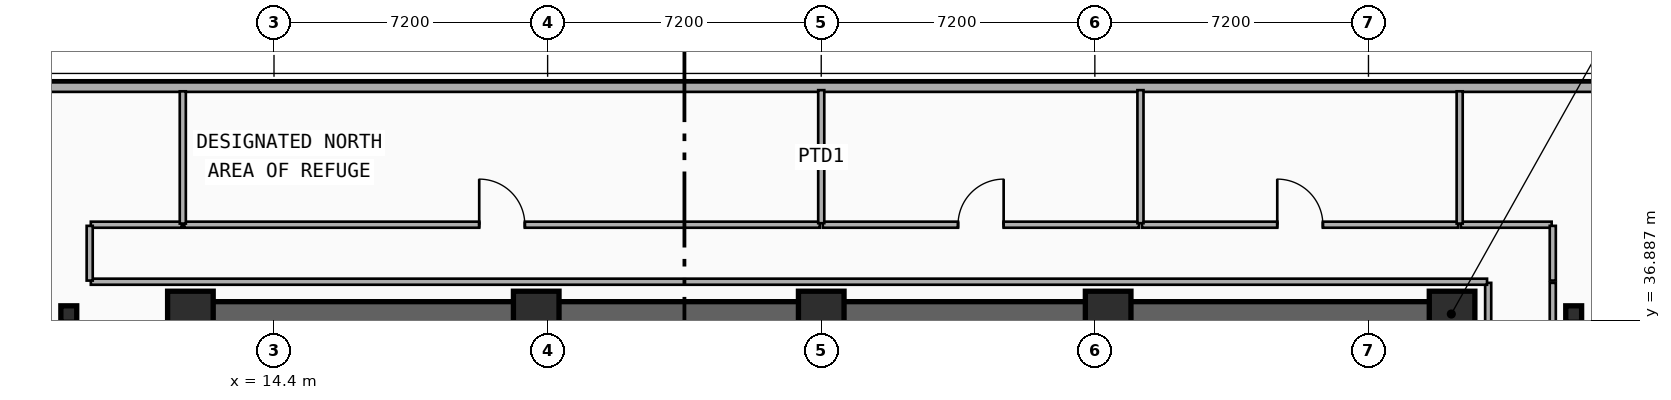
"""IFC4 building model, lengths in metres.
Left out: names, types, materials, properties, quantities, classifications, styles, units other than length and angle.
Written with IfcOpenShell. Run it as: python <this file> out.ifc"""

import sys

from ifc_helpers import new_model, si_unit, direction, frame, frame_2d, origin, origin_2d, place, context, subcontext, project, spatial, rectangle, i_section, extrude, element, fill, save


model = new_model("IFC4")
c1 = context("Model", 3, precision=1e-05, world=origin(), true_north=direction((0.0, 1.0)))
c2 = subcontext(c1, "Body", "Model", "MODEL_VIEW")
j1 = project(units=[si_unit("LENGTHUNIT", "METRE"), si_unit("PLANEANGLEUNIT", "RADIAN")], contexts=[c1])
p1 = place(None, origin())
s1 = spatial("IfcSite", under=j1, at=p1, CompositionType="ELEMENT")
p2 = place(p1, origin())
s2 = spatial("IfcBuilding", under=s1, at=p2, CompositionType="ELEMENT")
p3 = place(p2, frame((0.0, 0.0, 132.9)))
s3 = spatial("IfcBuildingStorey", under=s2, at=p3, CompositionType="ELEMENT", Elevation=132.9)
p4 = place(p3, frame((12.15, 37.05, 0.0), z_axis=(0.0, 0.0, 1.0), x_axis=(1.0, 0.0, 0.0)))
e1 = element("IfcWall", 1, at=p4, inside=s3, PredefinedType="SHEAR", context=c2, shape_type="SweptSolid", body=[
    extrude(rectangle(XDim=33.23, YDim=0.65, at=frame_2d((16.615, 0.0))), origin(), (0.0, 0.0, 1.0), 4.8),
])
for number, where, z_axis, x_axis in (
    (2, (12.2, 37.05, 0.0), (0.0, 0.0, 1.0), (1.0, 0.0, 0.0)),
    (3, (21.3, 37.05, 0.0), (0.0, 0.0, 1.0), (1.0, 0.0, 0.0)),
    (4, (28.8, 37.05, 0.0), (0.0, 0.0, 1.0), (1.0, 0.0, 0.0)),
    (5, (36.35, 37.05, 0.0), (0.0, 0.0, 1.0), (1.0, 0.0, 0.0)),
    (6, (45.4, 37.05, 0.0), (0.0, 0.0, 1.0), (1.0, 0.0, 0.0)),
):
    element("IfcColumn", number, at=place(p3, frame(where, z_axis=z_axis, x_axis=x_axis)), inside=s3, PredefinedType="COLUMN", context=c2, shape_type="SweptSolid", body=[
        extrude(rectangle(XDim=1.2, YDim=1.2, at=origin_2d()), origin(), (0.0, 0.0, 1.0), 4.8),
    ])
for number, where, z_axis, x_axis in (
    (7, (9.0, 37.05, 0.0), (0.0, 0.0, 1.0), (1.0, 0.0, 0.0)),
    (8, (48.6, 37.05, 0.0), (0.0, 0.0, 1.0), (1.0, 0.0, 0.0)),
):
    element("IfcColumn", number, at=place(p3, frame(where, z_axis=z_axis, x_axis=x_axis)), inside=s3, PredefinedType="COLUMN", context=c2, shape_type="SweptSolid", body=[
        extrude(i_section(OverallWidth=0.418, OverallDepth=0.432, WebThickness=0.035, FlangeThickness=0.056, FilletRadius=0.015, at=origin_2d()), origin(), (0.0, 0.0, 1.0), 4.8),
    ])
p5 = place(p3, frame((4.2, 43.02, 0.0), z_axis=(0.0, 0.0, 1.0), x_axis=(1.0, 0.0, 0.0)))
e9 = element("IfcWall", 9, at=p5, inside=s3, PredefinedType="SOLIDWALL", context=c2, shape_type="SweptSolid", body=[
    extrude(rectangle(XDim=49.2, YDim=0.25, at=frame_2d((24.6, 0.0))), origin(), (0.0, 0.0, 1.0), 4.48),
])
p6 = place(p3, frame((12.04, 39.4, 0.0), z_axis=(0.0, 0.0, 1.0), x_axis=(1.0, 0.0, 0.0)))
e10 = element("IfcWall", 10, at=p6, inside=s3, PredefinedType="PARTITIONING", context=c2, shape_type="SweptSolid", body=[
    extrude(rectangle(XDim=16.72, YDim=0.16, at=frame_2d((8.36, 0.0))), origin(), (0.0, 0.0, 1.0), 4.48),
])
p7 = place(p6, frame((7.76, 0.0, 0.0)))
e11 = element("IfcOpeningElement", 11, at=p7, cuts=e10, PredefinedType="OPENING", context=c2, shape_type="SweptSolid", body=[
    extrude(rectangle(XDim=1.2, YDim=2.15, at=frame_2d((0.6, 1.075))), frame((0.0, 0.09, 0.0), z_axis=(0.0, -1.0, 0.0), x_axis=(1.0, 0.0, 0.0)), (0.0, 0.0, 1.0), 0.18),
])
p8 = place(p3, frame((28.84, 39.4, 0.0), z_axis=(0.0, 0.0, 1.0), x_axis=(1.0, 0.0, 0.0)))
e12 = element("IfcWall", 12, at=p8, inside=s3, PredefinedType="PARTITIONING", context=c2, shape_type="SweptSolid", body=[
    extrude(rectangle(XDim=8.32, YDim=0.16, at=frame_2d((4.16, 0.0))), origin(), (0.0, 0.0, 1.0), 4.48),
])
p9 = place(p8, frame((3.56, 0.0, 0.0)))
e13 = element("IfcOpeningElement", 13, at=p9, cuts=e12, PredefinedType="OPENING", context=c2, shape_type="SweptSolid", body=[
    extrude(rectangle(XDim=1.2, YDim=2.15, at=frame_2d((0.6, 1.075))), frame((0.0, 0.09, 0.0), z_axis=(0.0, -1.0, 0.0), x_axis=(1.0, 0.0, 0.0)), (0.0, 0.0, 1.0), 0.18),
])
p10 = place(p3, frame((37.24, 39.4, 0.0), z_axis=(0.0, 0.0, 1.0), x_axis=(1.0, 0.0, 0.0)))
e14 = element("IfcWall", 14, at=p10, inside=s3, PredefinedType="PARTITIONING", context=c2, shape_type="SweptSolid", body=[
    extrude(rectangle(XDim=8.32, YDim=0.16, at=frame_2d((4.16, 0.0))), origin(), (0.0, 0.0, 1.0), 4.48),
])
p11 = place(p10, frame((3.56, 0.0, 0.0)))
e15 = element("IfcOpeningElement", 15, at=p11, cuts=e14, PredefinedType="OPENING", context=c2, shape_type="SweptSolid", body=[
    extrude(rectangle(XDim=1.2, YDim=2.15, at=frame_2d((0.6, 1.075))), frame((0.0, 0.09, 0.0), z_axis=(0.0, -1.0, 0.0), x_axis=(1.0, 0.0, 0.0)), (0.0, 0.0, 1.0), 0.18),
])
for number, where, z_axis, x_axis in (
    (16, (28.8, 39.44, 0.0), (0.0, 0.0, 1.0), (0.0, 1.0, 0.0)),
    (17, (37.2, 39.44, 0.0), (0.0, 0.0, 1.0), (0.0, 1.0, 0.0)),
):
    element("IfcWall", number, at=place(p3, frame(where, z_axis=z_axis, x_axis=x_axis)), inside=s3, PredefinedType="PARTITIONING", context=c2, shape_type="SweptSolid", body=[
        extrude(rectangle(XDim=3.5, YDim=0.16, at=frame_2d((1.75, 0.0))), origin(), (0.0, 0.0, 1.0), 4.48),
    ])
for number, where, z_axis, x_axis in (
    (18, (46.35, 27.63, 0.0), (0.0, 0.0, 1.0), (0.0, 1.0, 0.0)),
    (19, (48.05, 27.63, 0.0), (0.0, 0.0, 1.0), (0.0, 1.0, 0.0)),
):
    element("IfcWall", number, at=place(p3, frame(where, z_axis=z_axis, x_axis=x_axis)), inside=s3, PredefinedType="PARTITIONING", context=c2, shape_type="SweptSolid", body=[
        extrude(rectangle(XDim=10.24, YDim=0.16, at=frame_2d((5.12, 0.0))), origin(), (0.0, 0.0, 1.0), 3.96),
    ])
p12 = place(p3, frame((9.58, 37.9, 0.0), z_axis=(0.0, 0.0, 1.0), x_axis=(1.0, 0.0, 0.0)))
e20 = element("IfcWall", 20, at=p12, inside=s3, PredefinedType="PARTITIONING", context=c2, shape_type="SweptSolid", body=[
    extrude(rectangle(XDim=36.74, YDim=0.16, at=frame_2d((18.37, 0.0))), origin(), (0.0, 0.0, 1.0), 4.48),
])
p13 = place(p3, frame((9.58, 39.4, 0.0), z_axis=(0.0, 0.0, 1.0), x_axis=(1.0, 0.0, 0.0)))
e21 = element("IfcWall", 21, at=p13, inside=s3, PredefinedType="PARTITIONING", context=c2, shape_type="SweptSolid", body=[
    extrude(rectangle(XDim=2.39, YDim=0.16, at=frame_2d((1.195, 0.0))), origin(), (0.0, 0.0, 1.0), 4.48),
])
p14 = place(p3, frame((45.63, 39.4, 0.0), z_axis=(0.0, 0.0, 1.0), x_axis=(1.0, 0.0, 0.0)))
e22 = element("IfcWall", 22, at=p14, inside=s3, PredefinedType="PARTITIONING", context=c2, shape_type="SweptSolid", body=[
    extrude(rectangle(XDim=2.39, YDim=0.16, at=frame_2d((1.195, 0.0))), origin(), (0.0, 0.0, 1.0), 4.48),
])
for number, where, z_axis, x_axis in (
    (23, (9.55, 37.93, 0.0), (0.0, 0.0, 1.0), (0.0, 1.0, 0.0)),
    (24, (48.05, 37.93, 0.0), (0.0, 0.0, 1.0), (0.0, 1.0, 0.0)),
):
    element("IfcWall", number, at=place(p3, frame(where, z_axis=z_axis, x_axis=x_axis)), inside=s3, PredefinedType="PARTITIONING", context=c2, shape_type="SweptSolid", body=[
        extrude(rectangle(XDim=1.44, YDim=0.16, at=frame_2d((0.72, 0.0))), origin(), (0.0, 0.0, 1.0), 4.48),
    ])
for number, where, z_axis, x_axis in (
    (25, (12.0, 39.43, 0.0), (0.0, 0.0, 1.0), (0.0, 1.0, 0.0)),
    (26, (45.6, 39.43, 0.0), (0.0, 0.0, 1.0), (0.0, 1.0, 0.0)),
):
    element("IfcWall", number, at=place(p3, frame(where, z_axis=z_axis, x_axis=x_axis)), inside=s3, PredefinedType="PARTITIONING", context=c2, shape_type="SweptSolid", body=[
        extrude(rectangle(XDim=3.48, YDim=0.16, at=frame_2d((1.74, 0.0))), origin(), (0.0, 0.0, 1.0), 4.48),
    ])
p15 = place(p7, origin())
e27 = element("IfcDoor", 27, at=p15, inside=s3, OperationType="SINGLE_SWING_LEFT", PredefinedType="DOOR", context=c2, shape_type="SweptSolid", body=[
    extrude(rectangle(XDim=1.2, YDim=2.15, at=frame_2d((0.6, 1.075))), frame((0.0, 0.025, 0.0), z_axis=(0.0, -1.0, 0.0), x_axis=(1.0, 0.0, 0.0)), (0.0, 0.0, 1.0), 0.05),
])
fill(e11, e27)
p16 = place(p9, origin())
e28 = element("IfcDoor", 28, at=p16, inside=s3, OperationType="SINGLE_SWING_RIGHT", PredefinedType="DOOR", context=c2, shape_type="SweptSolid", body=[
    extrude(rectangle(XDim=1.2, YDim=2.15, at=frame_2d((0.6, 1.075))), frame((0.0, 0.025, 0.0), z_axis=(0.0, -1.0, 0.0), x_axis=(1.0, 0.0, 0.0)), (0.0, 0.0, 1.0), 0.05),
])
fill(e13, e28)
p17 = place(p11, origin())
e29 = element("IfcDoor", 29, at=p17, inside=s3, OperationType="SINGLE_SWING_LEFT", PredefinedType="DOOR", context=c2, shape_type="SweptSolid", body=[
    extrude(rectangle(XDim=1.2, YDim=2.15, at=frame_2d((0.6, 1.075))), frame((0.0, 0.025, 0.0), z_axis=(0.0, -1.0, 0.0), x_axis=(1.0, 0.0, 0.0)), (0.0, 0.0, 1.0), 0.05),
])
fill(e15, e29)
save(model, sys.argv[1])
